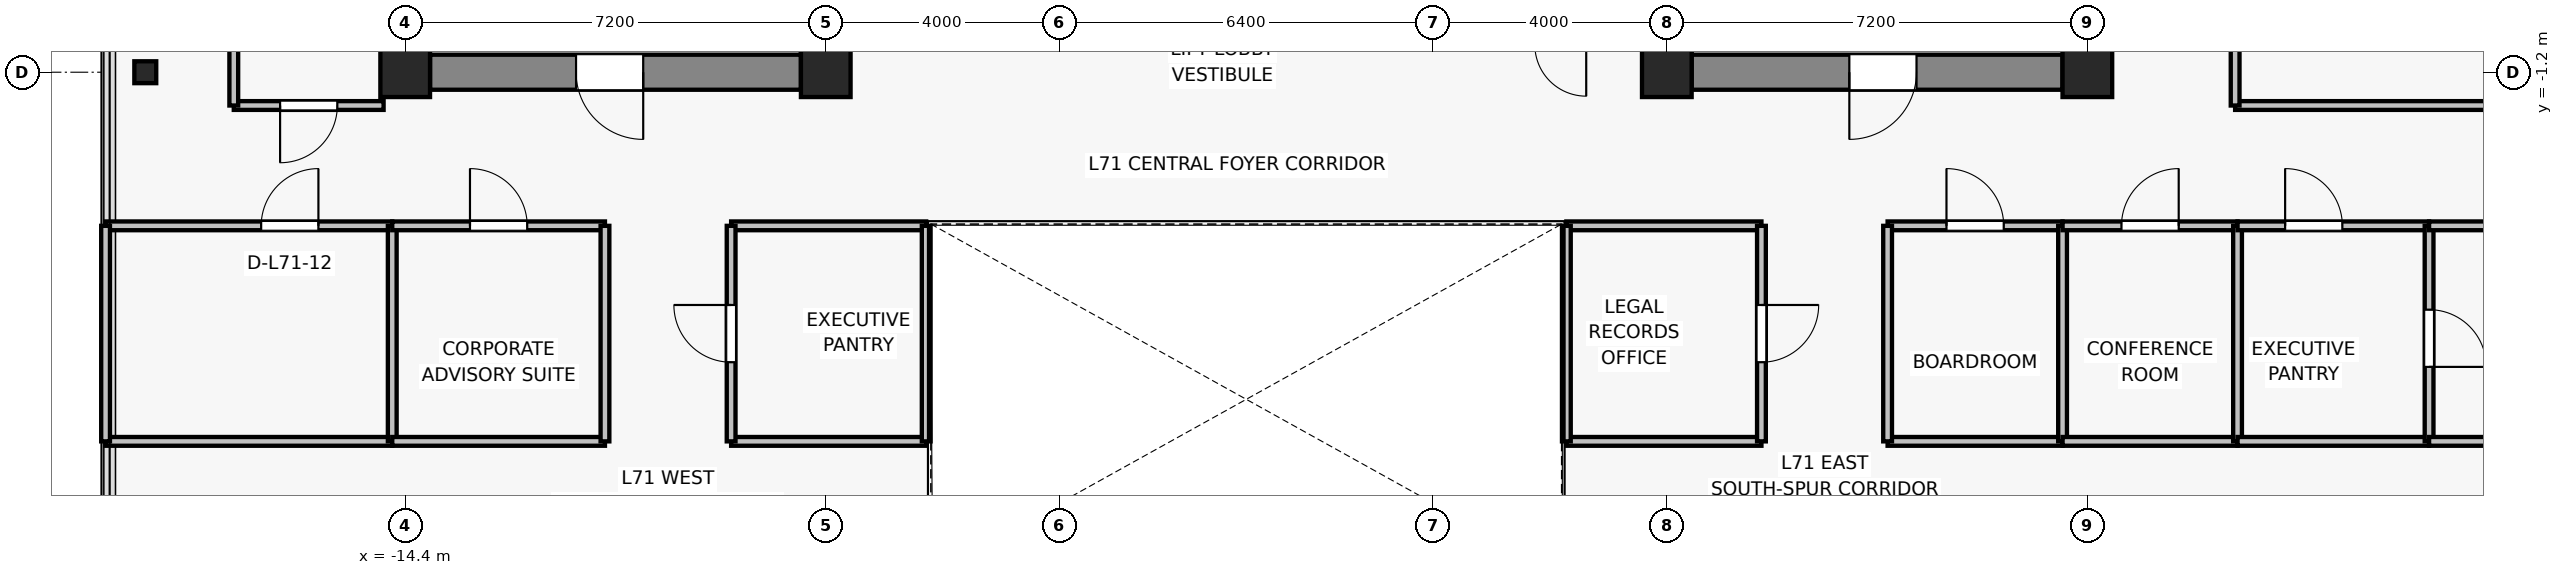
"""IFC4 building model, lengths in metres.
Left out: names, types, materials, properties, quantities, classifications, styles, units other than length and angle.
Written with IfcOpenShell. Run it as: python <this file> out.ifc"""

import sys

from ifc_helpers import new_model, si_unit, direction, frame, frame_2d, origin, origin_2d, place, context, subcontext, project, spatial, rectangle, i_section, extrude, source, transform, mapped, element, fill, save


model = new_model("IFC4")
c1 = context("Model", 3, precision=1e-05, world=origin(), true_north=direction((0.0, 1.0)))
c2 = subcontext(c1, "Body", "Model", "MODEL_VIEW")
j1 = project(units=[si_unit("LENGTHUNIT", "METRE"), si_unit("PLANEANGLEUNIT", "RADIAN")], contexts=[c1])
p1 = place(None, origin())
s1 = spatial("IfcSite", under=j1, at=p1, CompositionType="ELEMENT")
p2 = place(p1, origin())
s2 = spatial("IfcBuilding", under=s1, at=p2, CompositionType="ELEMENT")
p3 = place(p2, frame((0.0, 0.0, 251.8)))
s3 = spatial("IfcBuildingStorey", under=s2, at=p3, CompositionType="ELEMENT", Elevation=251.8)
for number, where, z_axis, x_axis in (
    (1, (-14.4, -1.2, 0.0), (0.0, 0.0, 1.0), (1.0, 0.0, 0.0)),
    (2, (-7.2, -1.2, 0.0), (0.0, 0.0, 1.0), (1.0, 0.0, 0.0)),
    (3, (7.2, -1.2, 0.0), (0.0, 0.0, 1.0), (1.0, 0.0, 0.0)),
    (4, (14.4, -1.2, 0.0), (0.0, 0.0, 1.0), (1.0, 0.0, 0.0)),
):
    element("IfcColumn", number, at=place(p3, frame(where, z_axis=z_axis, x_axis=x_axis)), inside=s3, PredefinedType="COLUMN", context=c2, shape_type="SweptSolid", body=[
        extrude(rectangle(XDim=0.85, YDim=0.85, at=origin_2d()), origin(), (0.0, 0.0, 1.0), 3.3),
    ])
p4 = place(p3, frame((-18.85, -1.2, 0.0), z_axis=(0.0, 0.0, 1.0), x_axis=(1.0, 0.0, 0.0)))
e5 = element("IfcColumn", 5, at=p4, inside=s3, PredefinedType="COLUMN", context=c2, shape_type="SweptSolid", body=[
    extrude(i_section(OverallWidth=0.375, OverallDepth=0.375, WebThickness=0.017, FlangeThickness=0.027, FilletRadius=0.015, at=origin_2d()), origin(), (0.0, 0.0, 1.0), 3.3),
])
p5 = place(p3, frame((-7.625, -1.2, 0.0), z_axis=(0.0, 0.0, 1.0), x_axis=(-1.0, 0.0, 0.0)))
e6 = element("IfcWall", 6, at=p5, inside=s3, PredefinedType="SHEAR", context=c2, shape_type="SweptSolid", body=[
    extrude(rectangle(XDim=6.35, YDim=0.6, at=frame_2d((3.175, 0.0))), origin(), (0.0, 0.0, 1.0), 3.075),
])
p6 = place(p5, frame((2.7, 0.0, 0.0)))
e7 = element("IfcOpeningElement", 7, at=p6, cuts=e6, PredefinedType="OPENING", context=c2, shape_type="SweptSolid", body=[
    extrude(rectangle(XDim=1.15, YDim=2.15, at=frame_2d((0.575, 1.075))), frame((0.0, 0.31, 0.0), z_axis=(0.0, -1.0, 0.0), x_axis=(1.0, 0.0, 0.0)), (0.0, 0.0, 1.0), 0.62),
])
p7 = place(p3, frame((13.975, -1.2, 0.0), z_axis=(0.0, 0.0, 1.0), x_axis=(-1.0, 0.0, 0.0)))
e8 = element("IfcWall", 8, at=p7, inside=s3, PredefinedType="SHEAR", context=c2, shape_type="SweptSolid", body=[
    extrude(rectangle(XDim=6.35, YDim=0.6, at=frame_2d((3.175, 0.0))), origin(), (0.0, 0.0, 1.0), 3.075),
])
p8 = place(p7, frame((2.5, 0.0, 0.0)))
e9 = element("IfcOpeningElement", 9, at=p8, cuts=e8, PredefinedType="OPENING", context=c2, shape_type="SweptSolid", body=[
    extrude(rectangle(XDim=1.15, YDim=2.15, at=frame_2d((0.575, 1.075))), frame((0.0, 0.31, 0.0), z_axis=(0.0, -1.0, 0.0), x_axis=(1.0, 0.0, 0.0)), (0.0, 0.0, 1.0), 0.62),
])
for number, where, z_axis, x_axis in (
    (10, (-7.4, -0.9, 0.0), (0.0, 0.0, 1.0), (0.0, 1.0, 0.0)),
    (11, (7.4, -0.9, 0.0), (0.0, 0.0, 1.0), (0.0, 1.0, 0.0)),
):
    element("IfcWall", number, at=place(p3, frame(where, z_axis=z_axis, x_axis=x_axis)), inside=s3, PredefinedType="SHEAR", context=c2, shape_type="SweptSolid", body=[
        extrude(rectangle(XDim=4.15, YDim=0.45, at=frame_2d((2.075, 0.0))), origin(), (0.0, 0.0, 1.0), 3.075),
    ])
p9 = place(p3, frame((-14.622, -7.52, 0.0), z_axis=(0.0, 0.0, 1.0), x_axis=(-1.0, 0.0, 0.0)))
e12 = element("IfcWall", 12, at=p9, inside=s3, PredefinedType="PARTITIONING", context=c2, shape_type="SweptSolid", body=[
    extrude(rectangle(XDim=4.908, YDim=0.15, at=frame_2d((2.454, 0.0))), origin(), (0.0, 0.0, 1.0), 2.615),
])
p10 = place(p3, frame((-19.53, -3.83, 0.0), z_axis=(0.0, 0.0, 1.0), x_axis=(1.0, 0.0, 0.0)))
e13 = element("IfcWall", 13, at=p10, inside=s3, PredefinedType="PARTITIONING", context=c2, shape_type="SweptSolid", body=[
    extrude(rectangle(XDim=4.908, YDim=0.15, at=frame_2d((2.454, 0.0))), origin(), (0.0, 0.0, 1.0), 2.615),
])
p11 = place(p10, frame((2.664, 0.0, 0.0)))
e14 = element("IfcOpeningElement", 14, at=p11, cuts=e13, PredefinedType="OPENING", context=c2, shape_type="SweptSolid", body=[
    extrude(rectangle(XDim=0.98, YDim=2.15, at=frame_2d((0.49, 1.075))), frame((0.0, 0.085, 0.0), z_axis=(0.0, -1.0, 0.0), x_axis=(1.0, 0.0, 0.0)), (0.0, 0.0, 1.0), 0.17),
])
p12 = place(p3, frame((-19.53, -7.52, 0.0), z_axis=(0.0, 0.0, 1.0), x_axis=(0.0, 1.0, 0.0)))
e15 = element("IfcWall", 15, at=p12, inside=s3, PredefinedType="PARTITIONING", context=c2, shape_type="SweptSolid", body=[
    extrude(rectangle(XDim=3.69, YDim=0.15, at=frame_2d((1.845, 0.0))), origin(), (0.0, 0.0, 1.0), 3.075),
])
p13 = place(p3, frame((-14.622, -3.83, 0.0), z_axis=(0.0, 0.0, 1.0), x_axis=(0.0, -1.0, 0.0)))
e16 = element("IfcWall", 16, at=p13, inside=s3, PredefinedType="PARTITIONING", context=c2, shape_type="SweptSolid", body=[
    extrude(rectangle(XDim=3.69, YDim=0.15, at=frame_2d((1.845, 0.0))), origin(), (0.0, 0.0, 1.0), 2.615),
])
p14 = place(p3, frame((-10.98, -7.52, 0.0), z_axis=(0.0, 0.0, 1.0), x_axis=(-1.0, 0.0, 0.0)))
e17 = element("IfcWall", 17, at=p14, inside=s3, PredefinedType="PARTITIONING", context=c2, shape_type="SweptSolid", body=[
    extrude(rectangle(XDim=3.642, YDim=0.15, at=frame_2d((1.821, 0.0))), origin(), (0.0, 0.0, 1.0), 2.615),
])
p15 = place(p3, frame((-14.622, -3.83, 0.0), z_axis=(0.0, 0.0, 1.0), x_axis=(1.0, 0.0, 0.0)))
e18 = element("IfcWall", 18, at=p15, inside=s3, PredefinedType="PARTITIONING", context=c2, shape_type="SweptSolid", body=[
    extrude(rectangle(XDim=3.642, YDim=0.15, at=frame_2d((1.821, 0.0))), origin(), (0.0, 0.0, 1.0), 2.615),
])
p16 = place(p15, frame((1.331, 0.0, 0.0)))
e19 = element("IfcOpeningElement", 19, at=p16, cuts=e18, PredefinedType="OPENING", context=c2, shape_type="SweptSolid", body=[
    extrude(rectangle(XDim=0.98, YDim=2.15, at=frame_2d((0.49, 1.075))), frame((0.0, 0.085, 0.0), z_axis=(0.0, -1.0, 0.0), x_axis=(1.0, 0.0, 0.0)), (0.0, 0.0, 1.0), 0.17),
])
p17 = place(p3, frame((-10.98, -3.83, 0.0), z_axis=(0.0, 0.0, 1.0), x_axis=(0.0, -1.0, 0.0)))
e20 = element("IfcWall", 20, at=p17, inside=s3, PredefinedType="PARTITIONING", context=c2, shape_type="SweptSolid", body=[
    extrude(rectangle(XDim=3.69, YDim=0.15, at=frame_2d((1.845, 0.0))), origin(), (0.0, 0.0, 1.0), 2.705),
])
p18 = place(p3, frame((13.976, -7.52, 0.0), z_axis=(0.0, 0.0, 1.0), x_axis=(-1.0, 0.0, 0.0)))
e21 = element("IfcWall", 21, at=p18, inside=s3, PredefinedType="PARTITIONING", context=c2, shape_type="SweptSolid", body=[
    extrude(rectangle(XDim=2.996, YDim=0.15, at=frame_2d((1.498, 0.0))), origin(), (0.0, 0.0, 1.0), 3.075),
])
p19 = place(p3, frame((10.98, -3.83, 0.0), z_axis=(0.0, 0.0, 1.0), x_axis=(1.0, 0.0, 0.0)))
e22 = element("IfcWall", 22, at=p19, inside=s3, PredefinedType="PARTITIONING", context=c2, shape_type="SweptSolid", body=[
    extrude(rectangle(XDim=2.996, YDim=0.15, at=frame_2d((1.498, 0.0))), origin(), (0.0, 0.0, 1.0), 3.075),
])
p20 = place(p19, frame((1.008, 0.0, 0.0)))
e23 = element("IfcOpeningElement", 23, at=p20, cuts=e22, PredefinedType="OPENING", context=c2, shape_type="SweptSolid", body=[
    extrude(rectangle(XDim=0.98, YDim=2.15, at=frame_2d((0.49, 1.075))), frame((0.0, 0.085, 0.0), z_axis=(0.0, -1.0, 0.0), x_axis=(1.0, 0.0, 0.0)), (0.0, 0.0, 1.0), 0.17),
])
for number, where, z_axis, x_axis in (
    (24, (10.98, -7.52, 0.0), (0.0, 0.0, 1.0), (0.0, 1.0, 0.0)),
    (25, (13.976, -3.83, 0.0), (0.0, 0.0, 1.0), (0.0, -1.0, 0.0)),
):
    element("IfcWall", number, at=place(p3, frame(where, z_axis=z_axis, x_axis=x_axis)), inside=s3, PredefinedType="PARTITIONING", context=c2, shape_type="SweptSolid", body=[
        extrude(rectangle(XDim=3.69, YDim=0.15, at=frame_2d((1.845, 0.0))), origin(), (0.0, 0.0, 1.0), 2.705),
    ])
p21 = place(p3, frame((16.971, -7.52, 0.0), z_axis=(0.0, 0.0, 1.0), x_axis=(-1.0, 0.0, 0.0)))
e26 = element("IfcWall", 26, at=p21, inside=s3, PredefinedType="PARTITIONING", context=c2, shape_type="SweptSolid", body=[
    extrude(rectangle(XDim=2.996, YDim=0.15, at=frame_2d((1.498, 0.0))), origin(), (0.0, 0.0, 1.0), 2.615),
])
p22 = place(p3, frame((13.976, -3.83, 0.0), z_axis=(0.0, 0.0, 1.0), x_axis=(1.0, 0.0, 0.0)))
e27 = element("IfcWall", 27, at=p22, inside=s3, PredefinedType="PARTITIONING", context=c2, shape_type="SweptSolid", body=[
    extrude(rectangle(XDim=2.996, YDim=0.15, at=frame_2d((1.498, 0.0))), origin(), (0.0, 0.0, 1.0), 2.615),
])
p23 = place(p22, frame((1.008, 0.0, 0.0)))
e28 = element("IfcOpeningElement", 28, at=p23, cuts=e27, PredefinedType="OPENING", context=c2, shape_type="SweptSolid", body=[
    extrude(rectangle(XDim=0.98, YDim=2.15, at=frame_2d((0.49, 1.075))), frame((0.0, 0.085, 0.0), z_axis=(0.0, -1.0, 0.0), x_axis=(1.0, 0.0, 0.0)), (0.0, 0.0, 1.0), 0.17),
])
p24 = place(p3, frame((16.971, -3.83, 0.0), z_axis=(0.0, 0.0, 1.0), x_axis=(0.0, -1.0, 0.0)))
e29 = element("IfcWall", 29, at=p24, inside=s3, PredefinedType="PARTITIONING", context=c2, shape_type="SweptSolid", body=[
    extrude(rectangle(XDim=3.69, YDim=0.15, at=frame_2d((1.845, 0.0))), origin(), (0.0, 0.0, 1.0), 2.705),
])
p25 = place(p3, frame((20.251, -7.52, 0.0), z_axis=(0.0, 0.0, 1.0), x_axis=(-1.0, 0.0, 0.0)))
e30 = element("IfcWall", 30, at=p25, inside=s3, PredefinedType="PARTITIONING", context=c2, shape_type="SweptSolid", body=[
    extrude(rectangle(XDim=3.279, YDim=0.15, at=frame_2d((1.64, 0.0))), origin(), (0.0, 0.0, 1.0), 3.075),
])
p26 = place(p3, frame((16.971, -3.83, 0.0), z_axis=(0.0, 0.0, 1.0), x_axis=(1.0, 0.0, 0.0)))
e31 = element("IfcWall", 31, at=p26, inside=s3, PredefinedType="PARTITIONING", context=c2, shape_type="SweptSolid", body=[
    extrude(rectangle(XDim=3.279, YDim=0.15, at=frame_2d((1.64, 0.0))), origin(), (0.0, 0.0, 1.0), 3.075),
])
p27 = place(p26, frame((0.815, 0.0, 0.0)))
e32 = element("IfcOpeningElement", 32, at=p27, cuts=e31, PredefinedType="OPENING", context=c2, shape_type="SweptSolid", body=[
    extrude(rectangle(XDim=0.98, YDim=2.15, at=frame_2d((0.49, 1.075))), frame((0.0, 0.085, 0.0), z_axis=(0.0, -1.0, 0.0), x_axis=(1.0, 0.0, 0.0)), (0.0, 0.0, 1.0), 0.17),
])
p28 = place(p3, frame((20.251, -3.83, 0.0), z_axis=(0.0, 0.0, 1.0), x_axis=(0.0, -1.0, 0.0)))
e33 = element("IfcWall", 33, at=p28, inside=s3, PredefinedType="PARTITIONING", context=c2, shape_type="SweptSolid", body=[
    extrude(rectangle(XDim=3.69, YDim=0.15, at=frame_2d((1.845, 0.0))), origin(), (0.0, 0.0, 1.0), 2.705),
])
p29 = place(p28, frame((1.435, 0.0, 0.0)))
e34 = element("IfcOpeningElement", 34, at=p29, cuts=e33, PredefinedType="OPENING", context=c2, shape_type="SweptSolid", body=[
    extrude(rectangle(XDim=0.98, YDim=2.15, at=frame_2d((0.49, 1.075))), frame((0.0, 0.085, 0.0), z_axis=(0.0, -1.0, 0.0), x_axis=(1.0, 0.0, 0.0)), (0.0, 0.0, 1.0), 0.17),
])
for number, where, z_axis, x_axis in (
    (35, (23.53, -7.52, 0.0), (0.0, 0.0, 1.0), (-1.0, 0.0, 0.0)),
    (36, (20.251, -3.83, 0.0), (0.0, 0.0, 1.0), (1.0, 0.0, 0.0)),
):
    element("IfcWall", number, at=place(p3, frame(where, z_axis=z_axis, x_axis=x_axis)), inside=s3, PredefinedType="PARTITIONING", context=c2, shape_type="SweptSolid", body=[
        extrude(rectangle(XDim=3.279, YDim=0.15, at=frame_2d((1.64, 0.0))), origin(), (0.0, 0.0, 1.0), 2.765),
    ])
for number, where, z_axis, x_axis in (
    (37, (-5.48, -7.52, 0.0), (0.0, 0.0, 1.0), (-1.0, 0.0, 0.0)),
    (38, (-8.82, -3.83, 0.0), (0.0, 0.0, 1.0), (1.0, 0.0, 0.0)),
):
    element("IfcWall", number, at=place(p3, frame(where, z_axis=z_axis, x_axis=x_axis)), inside=s3, PredefinedType="PARTITIONING", context=c2, shape_type="SweptSolid", body=[
        extrude(rectangle(XDim=3.34, YDim=0.15, at=frame_2d((1.67, 0.0))), origin(), (0.0, 0.0, 1.0), 2.615),
    ])
p30 = place(p3, frame((-8.82, -7.52, 0.0), z_axis=(0.0, 0.0, 1.0), x_axis=(0.0, 1.0, 0.0)))
e39 = element("IfcWall", 39, at=p30, inside=s3, PredefinedType="PARTITIONING", context=c2, shape_type="SweptSolid", body=[
    extrude(rectangle(XDim=3.69, YDim=0.15, at=frame_2d((1.845, 0.0))), origin(), (0.0, 0.0, 1.0), 2.705),
])
p31 = place(p30, frame((1.355, 0.0, 0.0)))
e40 = element("IfcOpeningElement", 40, at=p31, cuts=e39, PredefinedType="OPENING", context=c2, shape_type="SweptSolid", body=[
    extrude(rectangle(XDim=0.98, YDim=2.15, at=frame_2d((0.49, 1.075))), frame((0.0, 0.085, 0.0), z_axis=(0.0, -1.0, 0.0), x_axis=(1.0, 0.0, 0.0)), (0.0, 0.0, 1.0), 0.17),
])
p32 = place(p3, frame((-5.48, -3.83, 0.0), z_axis=(0.0, 0.0, 1.0), x_axis=(0.0, -1.0, 0.0)))
e41 = element("IfcWall", 41, at=p32, inside=s3, PredefinedType="PARTITIONING", context=c2, shape_type="SweptSolid", body=[
    extrude(rectangle(XDim=3.69, YDim=0.15, at=frame_2d((1.845, 0.0))), origin(), (0.0, 0.0, 1.0), 3.075),
])
for number, where, z_axis, x_axis in (
    (42, (8.82, -7.52, 0.0), (0.0, 0.0, 1.0), (-1.0, 0.0, 0.0)),
    (43, (5.48, -3.83, 0.0), (0.0, 0.0, 1.0), (1.0, 0.0, 0.0)),
):
    element("IfcWall", number, at=place(p3, frame(where, z_axis=z_axis, x_axis=x_axis)), inside=s3, PredefinedType="PARTITIONING", context=c2, shape_type="SweptSolid", body=[
        extrude(rectangle(XDim=3.34, YDim=0.15, at=frame_2d((1.67, 0.0))), origin(), (0.0, 0.0, 1.0), 2.615),
    ])
p33 = place(p3, frame((5.48, -7.52, 0.0), z_axis=(0.0, 0.0, 1.0), x_axis=(0.0, 1.0, 0.0)))
e44 = element("IfcWall", 44, at=p33, inside=s3, PredefinedType="PARTITIONING", context=c2, shape_type="SweptSolid", body=[
    extrude(rectangle(XDim=3.69, YDim=0.15, at=frame_2d((1.845, 0.0))), origin(), (0.0, 0.0, 1.0), 3.075),
])
p34 = place(p3, frame((8.82, -3.83, 0.0), z_axis=(0.0, 0.0, 1.0), x_axis=(0.0, -1.0, 0.0)))
e45 = element("IfcWall", 45, at=p34, inside=s3, PredefinedType="PARTITIONING", context=c2, shape_type="SweptSolid", body=[
    extrude(rectangle(XDim=3.69, YDim=0.15, at=frame_2d((1.845, 0.0))), origin(), (0.0, 0.0, 1.0), 2.705),
])
p35 = place(p34, frame((1.355, 0.0, 0.0)))
e46 = element("IfcOpeningElement", 46, at=p35, cuts=e45, PredefinedType="OPENING", context=c2, shape_type="SweptSolid", body=[
    extrude(rectangle(XDim=0.98, YDim=2.15, at=frame_2d((0.49, 1.075))), frame((0.0, 0.085, 0.0), z_axis=(0.0, -1.0, 0.0), x_axis=(1.0, 0.0, 0.0)), (0.0, 0.0, 1.0), 0.17),
])
p36 = place(p3, frame((-14.77, -1.77, 0.0), z_axis=(0.0, 0.0, 1.0), x_axis=(-1.0, 0.0, 0.0)))
e47 = element("IfcWall", 47, at=p36, inside=s3, PredefinedType="PARTITIONING", context=c2, shape_type="SweptSolid", body=[
    extrude(rectangle(XDim=2.565, YDim=0.15, at=frame_2d((1.282, 0.0))), origin(), (0.0, 0.0, 1.0), 3.075),
])
p37 = place(p36, frame((0.792, 0.0, 0.0)))
e48 = element("IfcOpeningElement", 48, at=p37, cuts=e47, PredefinedType="OPENING", context=c2, shape_type="SweptSolid", body=[
    extrude(rectangle(XDim=0.98, YDim=2.15, at=frame_2d((0.49, 1.075))), frame((0.0, 0.085, 0.0), z_axis=(0.0, -1.0, 0.0), x_axis=(1.0, 0.0, 0.0)), (0.0, 0.0, 1.0), 0.17),
])
p38 = place(p3, frame((-17.335, -1.77, 0.0), z_axis=(0.0, 0.0, 1.0), x_axis=(0.0, 1.0, 0.0)))
e49 = element("IfcWall", 49, at=p38, inside=s3, PredefinedType="PARTITIONING", context=c2, shape_type="SweptSolid", body=[
    extrude(rectangle(XDim=15.65, YDim=0.15, at=frame_2d((7.825, 0.0))), origin(), (0.0, 0.0, 1.0), 2.615),
])
p39 = place(p3, frame((23.53, -1.77, 0.0), z_axis=(0.0, 0.0, 1.0), x_axis=(-1.0, 0.0, 0.0)))
e50 = element("IfcWall", 50, at=p39, inside=s3, PredefinedType="PARTITIONING", context=c2, shape_type="SweptSolid", body=[
    extrude(rectangle(XDim=6.6, YDim=0.15, at=frame_2d((3.3, 0.0))), origin(), (0.0, 0.0, 1.0), 2.765),
])
p40 = place(p3, frame((16.93, -1.77, 0.0), z_axis=(0.0, 0.0, 1.0), x_axis=(0.0, 1.0, 0.0)))
e51 = element("IfcWall", 51, at=p40, inside=s3, PredefinedType="PARTITIONING", context=c2, shape_type="SweptSolid", body=[
    extrude(rectangle(XDim=6.973, YDim=0.15, at=frame_2d((3.487, 0.0))), origin(), (0.0, 0.0, 1.0), 2.615),
])
p41 = place(p40, frame((2.997, 0.0, 0.0)))
e52 = element("IfcOpeningElement", 52, at=p41, cuts=e51, PredefinedType="OPENING", context=c2, shape_type="SweptSolid", body=[
    extrude(rectangle(XDim=0.98, YDim=2.15, at=frame_2d((0.49, 1.075))), frame((0.0, 0.085, 0.0), z_axis=(0.0, -1.0, 0.0), x_axis=(1.0, 0.0, 0.0)), (0.0, 0.0, 1.0), 0.17),
])
m1 = source(origin(), c2, "Body", "SweptSolid", [
    extrude(rectangle(XDim=1.15, YDim=2.15, at=frame_2d((0.575, 1.075))), frame((0.0, 0.025, 0.0), z_axis=(0.0, -1.0, 0.0), x_axis=(1.0, 0.0, 0.0)), (0.0, 0.0, 1.0), 0.05),
])
p42 = place(p6, origin())
e53 = element("IfcDoor", 53, at=p42, inside=s3, OperationType="SINGLE_SWING_LEFT", PredefinedType="DOOR", context=c2, shape_type="MappedRepresentation", body=[
    mapped(m1, transform((0.0, 0.0, 0.0), x_axis=(1.0, 0.0, 0.0), y_axis=(0.0, 1.0, 0.0), z_axis=(0.0, 0.0, 1.0), scale=1.0)),
])
fill(e7, e53)
p43 = place(p8, origin())
e54 = element("IfcDoor", 54, at=p43, inside=s3, OperationType="SINGLE_SWING_RIGHT", PredefinedType="DOOR", context=c2, shape_type="MappedRepresentation", body=[
    mapped(m1, transform((0.0, 0.0, 0.0), x_axis=(1.0, 0.0, 0.0), y_axis=(0.0, 1.0, 0.0), z_axis=(0.0, 0.0, 1.0), scale=1.0)),
])
fill(e9, e54)
m2 = source(origin(), c2, "Body", "SweptSolid", [
    extrude(rectangle(XDim=0.98, YDim=2.15, at=frame_2d((0.49, 1.075))), frame((0.0, 0.025, 0.0), z_axis=(0.0, -1.0, 0.0), x_axis=(1.0, 0.0, 0.0)), (0.0, 0.0, 1.0), 0.05),
])
p44 = place(p11, origin())
e55 = element("IfcDoor", 55, at=p44, inside=s3, OperationType="SINGLE_SWING_RIGHT", PredefinedType="DOOR", context=c2, shape_type="MappedRepresentation", body=[
    mapped(m2, transform((0.0, 0.0, 0.0), x_axis=(1.0, 0.0, 0.0), y_axis=(0.0, 1.0, 0.0), z_axis=(0.0, 0.0, 1.0), scale=1.0)),
])
fill(e14, e55)
p45 = place(p16, origin())
e56 = element("IfcDoor", 56, at=p45, inside=s3, OperationType="SINGLE_SWING_LEFT", PredefinedType="DOOR", context=c2, shape_type="MappedRepresentation", body=[
    mapped(m2, transform((0.0, 0.0, 0.0), x_axis=(1.0, 0.0, 0.0), y_axis=(0.0, 1.0, 0.0), z_axis=(0.0, 0.0, 1.0), scale=1.0)),
])
fill(e19, e56)
p46 = place(p20, origin())
e57 = element("IfcDoor", 57, at=p46, inside=s3, OperationType="SINGLE_SWING_LEFT", PredefinedType="DOOR", context=c2, shape_type="MappedRepresentation", body=[
    mapped(m2, transform((0.0, 0.0, 0.0), x_axis=(1.0, 0.0, 0.0), y_axis=(0.0, 1.0, 0.0), z_axis=(0.0, 0.0, 1.0), scale=1.0)),
])
fill(e23, e57)
p47 = place(p23, origin())
e58 = element("IfcDoor", 58, at=p47, inside=s3, OperationType="SINGLE_SWING_RIGHT", PredefinedType="DOOR", context=c2, shape_type="MappedRepresentation", body=[
    mapped(m2, transform((0.0, 0.0, 0.0), x_axis=(1.0, 0.0, 0.0), y_axis=(0.0, 1.0, 0.0), z_axis=(0.0, 0.0, 1.0), scale=1.0)),
])
fill(e28, e58)
p48 = place(p27, origin())
e59 = element("IfcDoor", 59, at=p48, inside=s3, OperationType="SINGLE_SWING_LEFT", PredefinedType="DOOR", context=c2, shape_type="MappedRepresentation", body=[
    mapped(m2, transform((0.0, 0.0, 0.0), x_axis=(1.0, 0.0, 0.0), y_axis=(0.0, 1.0, 0.0), z_axis=(0.0, 0.0, 1.0), scale=1.0)),
])
fill(e32, e59)
p49 = place(p29, origin())
e60 = element("IfcDoor", 60, at=p49, inside=s3, OperationType="SINGLE_SWING_RIGHT", PredefinedType="DOOR", context=c2, shape_type="MappedRepresentation", body=[
    mapped(m2, transform((0.0, 0.0, 0.0), x_axis=(1.0, 0.0, 0.0), y_axis=(0.0, 1.0, 0.0), z_axis=(0.0, 0.0, 1.0), scale=1.0)),
])
fill(e34, e60)
p50 = place(p31, origin())
e61 = element("IfcDoor", 61, at=p50, inside=s3, OperationType="SINGLE_SWING_RIGHT", PredefinedType="DOOR", context=c2, shape_type="MappedRepresentation", body=[
    mapped(m2, transform((0.0, 0.0, 0.0), x_axis=(1.0, 0.0, 0.0), y_axis=(0.0, 1.0, 0.0), z_axis=(0.0, 0.0, 1.0), scale=1.0)),
])
fill(e40, e61)
p51 = place(p35, origin())
e62 = element("IfcDoor", 62, at=p51, inside=s3, OperationType="SINGLE_SWING_LEFT", PredefinedType="DOOR", context=c2, shape_type="MappedRepresentation", body=[
    mapped(m2, transform((0.0, 0.0, 0.0), x_axis=(1.0, 0.0, 0.0), y_axis=(0.0, 1.0, 0.0), z_axis=(0.0, 0.0, 1.0), scale=1.0)),
])
fill(e46, e62)
p52 = place(p37, origin())
e63 = element("IfcDoor", 63, at=p52, inside=s3, OperationType="SINGLE_SWING_RIGHT", PredefinedType="DOOR", context=c2, shape_type="MappedRepresentation", body=[
    mapped(m2, transform((0.0, 0.0, 0.0), x_axis=(1.0, 0.0, 0.0), y_axis=(0.0, 1.0, 0.0), z_axis=(0.0, 0.0, 1.0), scale=1.0)),
])
fill(e48, e63)
save(model, sys.argv[1])
